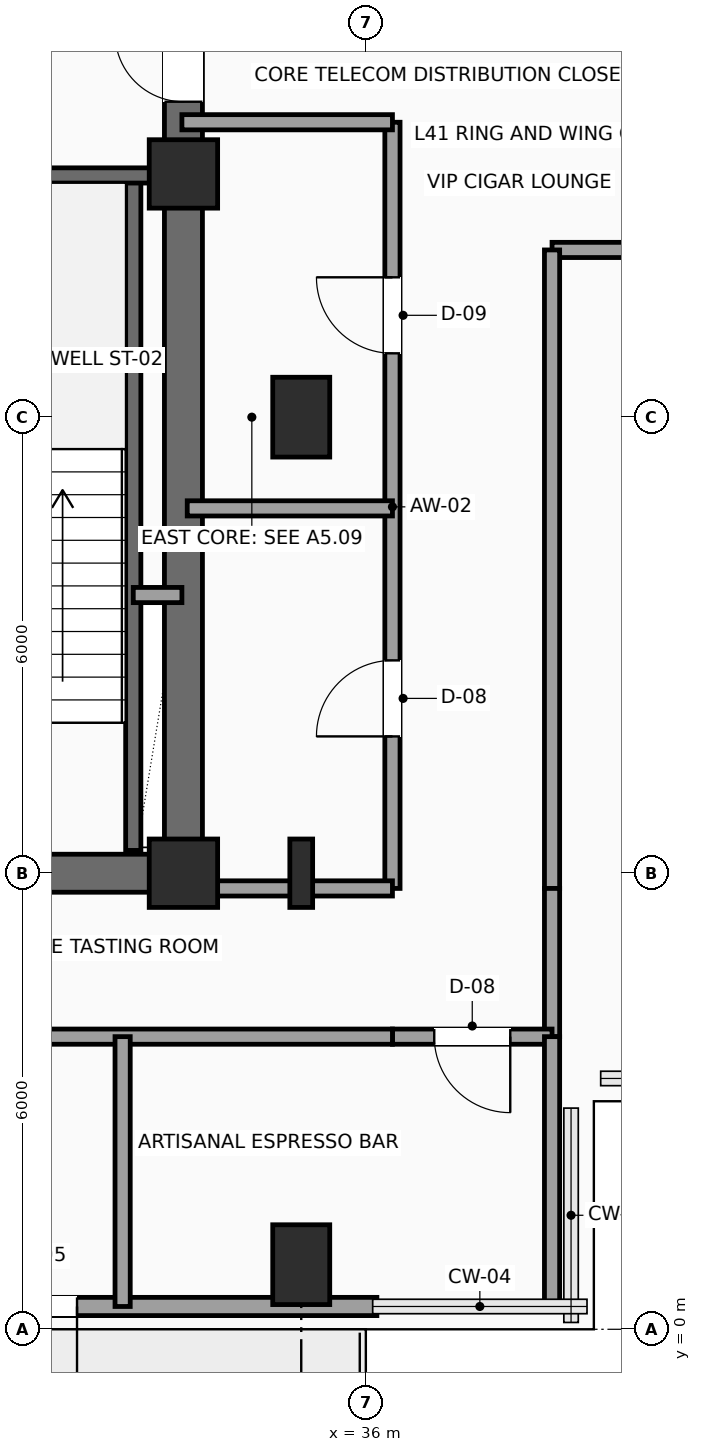
"""IFC4 building model, lengths in metres.
Left out: names, types, materials, properties, quantities, classifications, styles, units other than length and angle.
Written with IfcOpenShell. Run it as: python <this file> out.ifc"""

import sys

from ifc_helpers import new_model, si_unit, direction, frame, frame_2d, origin, origin_2d, place, context, subcontext, project, spatial, rectangle, i_section, extrude, element, fill, save


model = new_model("IFC4")
c1 = context("Model", 3, precision=1e-05, world=origin(), true_north=direction((0.0, 1.0)))
c2 = subcontext(c1, "Body", "Model", "MODEL_VIEW")
j1 = project(units=[si_unit("LENGTHUNIT", "METRE"), si_unit("PLANEANGLEUNIT", "RADIAN")], contexts=[c1])
p1 = place(None, origin())
s1 = spatial("IfcSite", under=j1, at=p1, CompositionType="ELEMENT")
p2 = place(p1, origin())
s2 = spatial("IfcBuilding", under=s1, at=p2, CompositionType="ELEMENT")
p3 = place(p2, frame((0.0, 0.0, 169.2)))
s3 = spatial("IfcBuildingStorey", under=s2, at=p3, CompositionType="ELEMENT", Elevation=169.2)
for number, where, z_axis, x_axis in (
    (1, (33.6, 6.0, 0.0), (0.0, 0.0, 1.0), (1.0, 0.0, 0.0)),
    (2, (33.6, 15.2, 0.0), (0.0, 0.0, 1.0), (1.0, 0.0, 0.0)),
):
    element("IfcColumn", number, at=place(p3, frame(where, z_axis=z_axis, x_axis=x_axis)), inside=s3, PredefinedType="COLUMN", context=c2, shape_type="SweptSolid", body=[
        extrude(rectangle(XDim=0.9, YDim=0.9, at=origin_2d()), origin(), (0.0, 0.0, 1.0), 3.75),
    ])
p4 = place(p3, frame((35.15, 0.85, 0.0), z_axis=(0.0, 0.0, 1.0), x_axis=(1.0, 0.0, 0.0)))
e3 = element("IfcColumn", 3, at=p4, inside=s3, PredefinedType="COLUMN", context=c2, shape_type="SweptSolid", body=[
    extrude(rectangle(XDim=0.75, YDim=1.05, at=origin_2d()), origin(), (0.0, 0.0, 1.0), 3.75),
])
p5 = place(p3, frame((35.15, 6.0, 0.0), z_axis=(0.0, 0.0, 1.0), x_axis=(1.0, 0.0, 0.0)))
e4 = element("IfcColumn", 4, at=p5, inside=s3, PredefinedType="COLUMN", context=c2, shape_type="SweptSolid", body=[
    extrude(i_section(OverallWidth=0.3, OverallDepth=0.9, WebThickness=0.019, FlangeThickness=0.035, FilletRadius=0.03, at=origin_2d()), origin(), (0.0, 0.0, 1.0), 3.75),
])
p6 = place(p3, frame((35.15, 12.0, 0.0), z_axis=(0.0, 0.0, 1.0), x_axis=(1.0, 0.0, 0.0)))
e5 = element("IfcColumn", 5, at=p6, inside=s3, PredefinedType="COLUMN", context=c2, shape_type="SweptSolid", body=[
    extrude(rectangle(XDim=0.75, YDim=1.05, at=origin_2d()), origin(), (0.0, 0.0, 1.0), 3.75),
])
p7 = place(p3, frame((36.145, 0.3, 0.0), z_axis=(0.0, 0.0, 1.0), x_axis=(-1.0, 0.0, 0.0)))
e6 = element("IfcWall", 6, at=p7, inside=s3, PredefinedType="SOLIDWALL", context=c2, shape_type="SweptSolid", body=[
    extrude(rectangle(XDim=9.29, YDim=0.24, at=frame_2d((4.645, 0.0))), origin(), (0.0, 0.0, 1.0), 3.54),
])
p8 = place(p7, frame((3.945, 0.0, 0.0)))
e7 = element("IfcOpeningElement", 7, at=p8, cuts=e6, PredefinedType="OPENING", context=c2, shape_type="SweptSolid", body=[
    extrude(rectangle(XDim=1.05, YDim=2.2, at=frame_2d((0.525, 1.1))), frame((0.0, 0.13, 0.0), z_axis=(0.0, -1.0, 0.0), x_axis=(1.0, 0.0, 0.0)), (0.0, 0.0, 1.0), 0.26),
])
p9 = place(p3, frame((24.0, 6.0, 0.0), z_axis=(0.0, 0.0, 1.0), x_axis=(1.0, 0.0, 0.0)))
e8 = element("IfcWall", 8, at=p9, inside=s3, PredefinedType="SHEAR", context=c2, shape_type="SweptSolid", body=[
    extrude(rectangle(XDim=9.6, YDim=0.5, at=frame_2d((4.8, 0.0))), origin(), (0.0, 0.0, 1.0), 3.54),
])
p10 = place(p3, frame((33.6, 6.0, 0.0), z_axis=(0.0, 0.0, 1.0), x_axis=(0.0, 1.0, 0.0)))
e9 = element("IfcWall", 9, at=p10, inside=s3, PredefinedType="SHEAR", context=c2, shape_type="SweptSolid", body=[
    extrude(rectangle(XDim=12.0, YDim=0.5, at=frame_2d((6.0, 0.0))), origin(), (0.0, 0.0, 1.0), 3.54),
])
p11 = place(p10, frame((10.15, 0.0, 0.0)))
e10 = element("IfcOpeningElement", 10, at=p11, cuts=e9, PredefinedType="OPENING", context=c2, shape_type="SweptSolid", body=[
    extrude(rectangle(XDim=0.9, YDim=2.15, at=frame_2d((0.45, 1.075))), frame((0.0, 0.26, 0.0), z_axis=(0.0, -1.0, 0.0), x_axis=(1.0, 0.0, 0.0)), (0.0, 0.0, 1.0), 0.52),
])
p12 = place(p3, frame((32.94, 6.3, 0.0), z_axis=(0.0, 0.0, 1.0), x_axis=(0.0, 1.0, 0.0)))
e11 = element("IfcWall", 11, at=p12, inside=s3, PredefinedType="SHEAR", context=c2, shape_type="SweptSolid", body=[
    extrude(rectangle(XDim=8.88, YDim=0.2, at=frame_2d((4.44, 0.0))), origin(), (0.0, 0.0, 1.0), 3.54),
])
p13 = place(p3, frame((29.26, 15.18, 0.0), z_axis=(0.0, 0.0, 1.0), x_axis=(1.0, 0.0, 0.0)))
e12 = element("IfcWall", 12, at=p13, inside=s3, PredefinedType="SHEAR", context=c2, shape_type="SweptSolid", body=[
    extrude(rectangle(XDim=4.04, YDim=0.2, at=frame_2d((2.02, 0.0))), origin(), (0.0, 0.0, 1.0), 3.54),
])
p14 = place(p3, frame((32.94, 9.66, 0.0), z_axis=(0.0, 0.0, 1.0), x_axis=(1.0, 0.0, 0.0)))
e13 = element("IfcWall", 13, at=p14, inside=s3, PredefinedType="SOLIDWALL", context=c2, shape_type="SweptSolid", body=[
    extrude(rectangle(XDim=0.64, YDim=0.2, at=frame_2d((0.32, 0.0))), origin(), (0.0, 0.0, 1.0), 3.54),
])
p15 = place(p3, frame((36.35, 5.8, 0.0), z_axis=(0.0, 0.0, 1.0), x_axis=(0.0, 1.0, 0.0)))
e14 = element("IfcWall", 14, at=p15, inside=s3, PredefinedType="PARTITIONING", context=c2, shape_type="SweptSolid", body=[
    extrude(rectangle(XDim=10.08, YDim=0.2, at=frame_2d((5.04, 0.0))), origin(), (0.0, 0.0, 1.0), 3.54),
])
p16 = place(p15, frame((2.0, 0.0, 0.0)))
e15 = element("IfcOpeningElement", 15, at=p16, cuts=e14, PredefinedType="OPENING", context=c2, shape_type="SweptSolid", body=[
    extrude(rectangle(XDim=1.0, YDim=2.2, at=frame_2d((0.5, 1.1))), frame((0.0, 0.11, 0.0), z_axis=(0.0, -1.0, 0.0), x_axis=(1.0, 0.0, 0.0)), (0.0, 0.0, 1.0), 0.22),
])
p17 = place(p15, frame((7.04, 0.0, 0.0)))
e16 = element("IfcOpeningElement", 16, at=p17, cuts=e14, PredefinedType="OPENING", context=c2, shape_type="SweptSolid", body=[
    extrude(rectangle(XDim=1.0, YDim=2.2, at=frame_2d((0.5, 1.1))), frame((0.0, 0.11, 0.0), z_axis=(0.0, -1.0, 0.0), x_axis=(1.0, 0.0, 0.0)), (0.0, 0.0, 1.0), 0.22),
])
p18 = place(p3, frame((36.35, 15.88, 0.0), z_axis=(0.0, 0.0, 1.0), x_axis=(-1.0, 0.0, 0.0)))
e17 = element("IfcWall", 17, at=p18, inside=s3, PredefinedType="PARTITIONING", context=c2, shape_type="SweptSolid", body=[
    extrude(rectangle(XDim=2.77, YDim=0.2, at=frame_2d((1.385, 0.0))), origin(), (0.0, 0.0, 1.0), 3.54),
])
p19 = place(p3, frame((41.7, 14.2, 0.0), z_axis=(0.0, 0.0, 1.0), x_axis=(-1.0, 0.0, 0.0)))
e18 = element("IfcWall", 18, at=p19, inside=s3, PredefinedType="PARTITIONING", context=c2, shape_type="SweptSolid", body=[
    extrude(rectangle(XDim=3.25, YDim=0.2, at=frame_2d((1.625, 0.0))), origin(), (0.0, 0.0, 1.0), 3.54),
])
p20 = place(p3, frame((38.45, 14.2, 0.0), z_axis=(0.0, 0.0, 1.0), x_axis=(0.0, -1.0, 0.0)))
e19 = element("IfcWall", 19, at=p20, inside=s3, PredefinedType="PARTITIONING", context=c2, shape_type="SweptSolid", body=[
    extrude(rectangle(XDim=8.4, YDim=0.2, at=frame_2d((4.2, 0.0))), origin(), (0.0, 0.0, 1.0), 3.54),
])
p21 = place(p3, frame((38.45, 5.8, 0.0), z_axis=(0.0, 0.0, 1.0), x_axis=(0.0, -1.0, 0.0)))
e20 = element("IfcWall", 20, at=p21, inside=s3, PredefinedType="PARTITIONING", context=c2, shape_type="SweptSolid", body=[
    extrude(rectangle(XDim=1.95, YDim=0.2, at=frame_2d((0.975, 0.0))), origin(), (0.0, 0.0, 1.0), 3.54),
])
p22 = place(p3, frame((38.45, 3.85, 0.0), z_axis=(0.0, 0.0, 1.0), x_axis=(-1.0, 0.0, 0.0)))
e21 = element("IfcWall", 21, at=p22, inside=s3, PredefinedType="PARTITIONING", context=c2, shape_type="SweptSolid", body=[
    extrude(rectangle(XDim=2.1, YDim=0.2, at=frame_2d((1.05, 0.0))), origin(), (0.0, 0.0, 1.0), 3.54),
])
p23 = place(p22, frame((0.55, 0.0, 0.0)))
e22 = element("IfcOpeningElement", 22, at=p23, cuts=e21, PredefinedType="OPENING", context=c2, shape_type="SweptSolid", body=[
    extrude(rectangle(XDim=1.0, YDim=2.2, at=frame_2d((0.5, 1.1))), frame((0.0, 0.11, 0.0), z_axis=(0.0, -1.0, 0.0), x_axis=(1.0, 0.0, 0.0)), (0.0, 0.0, 1.0), 0.22),
])
p24 = place(p3, frame((36.35, 3.85, 0.0), z_axis=(0.0, 0.0, 1.0), x_axis=(-1.0, 0.0, 0.0)))
e23 = element("IfcWall", 23, at=p24, inside=s3, PredefinedType="PARTITIONING", context=c2, shape_type="SweptSolid", body=[
    extrude(rectangle(XDim=12.4, YDim=0.2, at=frame_2d((6.2, 0.0))), origin(), (0.0, 0.0, 1.0), 3.54),
])
p25 = place(p24, frame((10.325, 0.0, 0.0)))
e24 = element("IfcOpeningElement", 24, at=p25, cuts=e23, PredefinedType="OPENING", context=c2, shape_type="SweptSolid", body=[
    extrude(rectangle(XDim=1.0, YDim=2.2, at=frame_2d((0.5, 1.1))), frame((0.0, 0.11, 0.0), z_axis=(0.0, -1.0, 0.0), x_axis=(1.0, 0.0, 0.0)), (0.0, 0.0, 1.0), 0.22),
])
p26 = place(p24, frame((5.9, 0.0, 0.0)))
e25 = element("IfcOpeningElement", 25, at=p26, cuts=e23, PredefinedType="OPENING", context=c2, shape_type="SweptSolid", body=[
    extrude(rectangle(XDim=1.0, YDim=2.2, at=frame_2d((0.5, 1.1))), frame((0.0, 0.11, 0.0), z_axis=(0.0, -1.0, 0.0), x_axis=(1.0, 0.0, 0.0)), (0.0, 0.0, 1.0), 0.22),
])
for number, where, z_axis, x_axis in (
    (26, (32.8, 0.3, 0.0), (0.0, 0.0, 1.0), (0.0, 1.0, 0.0)),
    (27, (38.45, 0.3, 0.0), (0.0, 0.0, 1.0), (0.0, 1.0, 0.0)),
):
    element("IfcWall", number, at=place(p3, frame(where, z_axis=z_axis, x_axis=x_axis)), inside=s3, PredefinedType="PARTITIONING", context=c2, shape_type="SweptSolid", body=[
        extrude(rectangle(XDim=3.55, YDim=0.2, at=frame_2d((1.775, 0.0))), origin(), (0.0, 0.0, 1.0), 3.54),
    ])
p27 = place(p3, frame((33.65, 5.8, 0.0), z_axis=(0.0, 0.0, 1.0), x_axis=(1.0, 0.0, 0.0)))
e28 = element("IfcWall", 28, at=p27, inside=s3, PredefinedType="PARTITIONING", context=c2, shape_type="SweptSolid", body=[
    extrude(rectangle(XDim=2.7, YDim=0.2, at=frame_2d((1.35, 0.0))), origin(), (0.0, 0.0, 1.0), 3.132),
])
p28 = place(p3, frame((33.65, 10.8, 0.0), z_axis=(0.0, 0.0, 1.0), x_axis=(1.0, 0.0, 0.0)))
e29 = element("IfcWall", 29, at=p28, inside=s3, PredefinedType="PARTITIONING", context=c2, shape_type="SweptSolid", body=[
    extrude(rectangle(XDim=2.7, YDim=0.2, at=frame_2d((1.35, 0.0))), origin(), (0.0, 0.0, 1.0), 3.54),
])
p29 = place(p8, origin())
e30 = element("IfcDoor", 30, at=p29, inside=s3, OperationType="SINGLE_SWING_LEFT", PredefinedType="DOOR", context=c2, shape_type="SweptSolid", body=[
    extrude(rectangle(XDim=1.05, YDim=2.2, at=frame_2d((0.525, 1.1))), frame((0.0, 0.025, 0.0), z_axis=(0.0, -1.0, 0.0), x_axis=(1.0, 0.0, 0.0)), (0.0, 0.0, 1.0), 0.05),
])
fill(e7, e30)
p30 = place(p11, origin())
e31 = element("IfcDoor", 31, at=p30, inside=s3, OperationType="SINGLE_SWING_RIGHT", PredefinedType="DOOR", context=c2, shape_type="SweptSolid", body=[
    extrude(rectangle(XDim=0.9, YDim=2.15, at=frame_2d((0.45, 1.075))), frame((0.0, 0.025, 0.0), z_axis=(0.0, -1.0, 0.0), x_axis=(1.0, 0.0, 0.0)), (0.0, 0.0, 1.0), 0.05),
])
fill(e10, e31)
p31 = place(p16, origin())
e32 = element("IfcDoor", 32, at=p31, inside=s3, OperationType="SINGLE_SWING_LEFT", PredefinedType="DOOR", context=c2, shape_type="SweptSolid", body=[
    extrude(rectangle(XDim=1.0, YDim=2.2, at=frame_2d((0.5, 1.1))), frame((0.0, 0.025, 0.0), z_axis=(0.0, -1.0, 0.0), x_axis=(1.0, 0.0, 0.0)), (0.0, 0.0, 1.0), 0.05),
])
fill(e15, e32)
p32 = place(p17, origin())
e33 = element("IfcDoor", 33, at=p32, inside=s3, OperationType="SINGLE_SWING_RIGHT", PredefinedType="DOOR", context=c2, shape_type="SweptSolid", body=[
    extrude(rectangle(XDim=1.0, YDim=2.2, at=frame_2d((0.5, 1.1))), frame((0.0, 0.025, 0.0), z_axis=(0.0, -1.0, 0.0), x_axis=(1.0, 0.0, 0.0)), (0.0, 0.0, 1.0), 0.05),
])
fill(e16, e33)
p33 = place(p23, origin())
e34 = element("IfcDoor", 34, at=p33, inside=s3, OperationType="SINGLE_SWING_LEFT", PredefinedType="DOOR", context=c2, shape_type="SweptSolid", body=[
    extrude(rectangle(XDim=1.0, YDim=2.2, at=frame_2d((0.5, 1.1))), frame((0.0, 0.025, 0.0), z_axis=(0.0, -1.0, 0.0), x_axis=(1.0, 0.0, 0.0)), (0.0, 0.0, 1.0), 0.05),
])
fill(e22, e34)
save(model, sys.argv[1])
